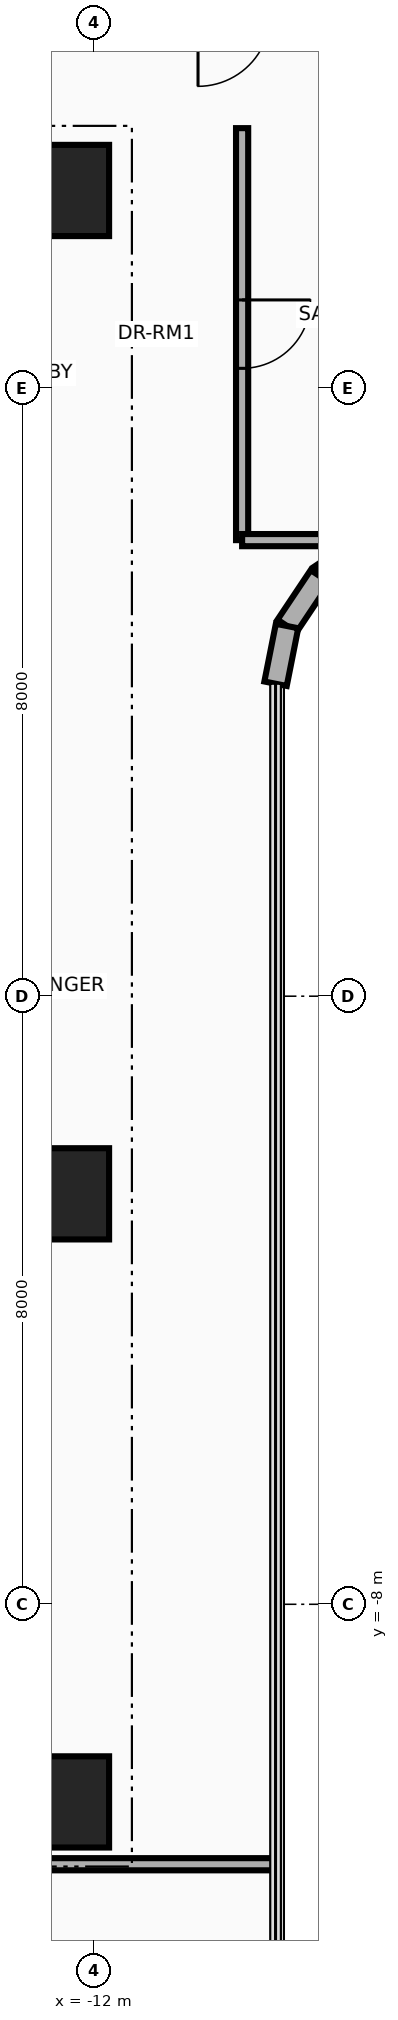
"""IFC4 building model, lengths in metres.
Left out: names, types, materials, properties, quantities, classifications, styles, units other than length and angle.
Written with IfcOpenShell. Run it as: python <this file> out.ifc"""

import sys

from ifc_helpers import new_model, si_unit, direction, frame, frame_2d, origin, origin_2d, place, context, subcontext, project, spatial, rectangle, extrude, source, transform, mapped, element, fill, save


model = new_model("IFC4")
c1 = context("Model", 3, precision=1e-05, world=origin(), true_north=direction((0.0, 1.0)))
c2 = subcontext(c1, "Body", "Model", "MODEL_VIEW")
j1 = project(units=[si_unit("LENGTHUNIT", "METRE"), si_unit("PLANEANGLEUNIT", "RADIAN")], contexts=[c1])
p1 = place(None, origin())
s1 = spatial("IfcSite", under=j1, at=p1, CompositionType="ELEMENT")
p2 = place(p1, origin())
s2 = spatial("IfcBuilding", under=s1, at=p2, CompositionType="ELEMENT")
p3 = place(p2, frame((0.0, 0.0, 157.5)))
s3 = spatial("IfcBuildingStorey", under=s2, at=p3, CompositionType="ELEMENT", Elevation=157.5)
for number, where, z_axis, x_axis in (
    (1, (-22.65, 10.8, 0.0), (0.0, 0.0, 1.0), (1.0, 0.0, 0.0)),
    (2, (-22.65, -10.8, 0.0), (0.0, 0.0, 1.0), (1.0, 0.0, 0.0)),
):
    element("IfcWall", number, at=place(p3, frame(where, z_axis=z_axis, x_axis=x_axis)), inside=s3, PredefinedType="SHEAR", context=c2, shape_type="SweptSolid", body=[
        extrude(rectangle(XDim=10.25, YDim=0.55, at=frame_2d((5.125, 0.0))), origin(), (0.0, 0.0, 1.0), 3.46),
    ])
m1 = source(origin(), c2, "Body", "SweptSolid", [
    extrude(rectangle(XDim=1.2, YDim=1.2, at=origin_2d()), origin(), (0.0, 0.0, 1.0), 3.7),
])
for number, where, z_axis, x_axis in (
    (3, (-12.4, -10.6, 0.0), (0.0, 0.0, 1.0), (1.0, 0.0, 0.0)),
    (4, (-12.4, -2.6, 0.0), (0.0, 0.0, 1.0), (1.0, 0.0, 0.0)),
    (5, (-12.4, 10.6, 0.0), (0.0, 0.0, 1.0), (1.0, 0.0, 0.0)),
):
    element("IfcColumn", number, at=place(p3, frame(where, z_axis=z_axis, x_axis=x_axis)), inside=s3, PredefinedType="COLUMN", context=c2, shape_type="MappedRepresentation", body=[
        mapped(m1, transform((0.0, 0.0, 0.0), x_axis=(1.0, 0.0, 0.0), y_axis=(0.0, 1.0, 0.0), z_axis=(0.0, 0.0, 1.0), scale=1.0)),
    ])
for number, where, z_axis, x_axis in (
    (6, (-8.37, 5.959, 0.0), (0.0, 0.0, 1.0), (-0.831, -0.556, 0.0)),
    (7, (-9.023, 5.523, 0.0), (0.0, 0.0, 1.0), (-0.556, -0.831, 0.0)),
):
    element("IfcWall", number, at=place(p3, frame(where, z_axis=z_axis, x_axis=x_axis)), inside=s3, PredefinedType="SOLIDWALL", context=c2, shape_type="SweptSolid", body=[
        extrude(rectangle(XDim=0.785, YDim=0.3, at=frame_2d((0.393, 0.0))), origin(), (0.0, 0.0, 1.0), 3.46),
    ])
p4 = place(p3, frame((-9.459, 4.87, 0.0), z_axis=(0.0, 0.0, 1.0), x_axis=(-0.195206365311, -0.98076219082, 0.0)))
e8 = element("IfcWall", 8, at=p4, inside=s3, PredefinedType="SOLIDWALL", context=c2, shape_type="SweptSolid", body=[
    extrude(rectangle(XDim=0.774, YDim=0.3, at=frame_2d((0.387, 0.0))), origin(), (0.0, 0.0, 1.0), 3.46),
])
p5 = place(p3, frame((-23.45, -11.42, 0.0), z_axis=(0.0, 0.0, 1.0), x_axis=(1.0, 0.0, 0.0)))
e9 = element("IfcWall", 9, at=p5, inside=s3, PredefinedType="PARTITIONING", context=c2, shape_type="SweptSolid", body=[
    extrude(rectangle(XDim=13.84, YDim=0.16, at=frame_2d((6.92, 0.0))), origin(), (0.0, 0.0, 1.0), 2.834),
])
p6 = place(p3, frame((-10.05, 6.0, 0.0), z_axis=(0.0, 0.0, 1.0), x_axis=(0.0, 1.0, 0.0)))
e10 = element("IfcWall", 10, at=p6, inside=s3, PredefinedType="PARTITIONING", context=c2, shape_type="SweptSolid", body=[
    extrude(rectangle(XDim=5.42, YDim=0.16, at=frame_2d((2.71, 0.0))), origin(), (0.0, 0.0, 1.0), 3.46),
])
p7 = place(p6, frame((2.26, 0.0, 0.0)))
e11 = element("IfcOpeningElement", 11, at=p7, cuts=e10, PredefinedType="OPENING", context=c2, shape_type="SweptSolid", body=[
    extrude(rectangle(XDim=0.9, YDim=2.1, at=frame_2d((0.45, 1.05))), frame((0.0, 0.095, 0.0), z_axis=(0.0, -1.0, 0.0), x_axis=(1.0, 0.0, 0.0)), (0.0, 0.0, 1.0), 0.19),
])
p8 = place(p3, frame((-10.05, 6.0, 0.0), z_axis=(0.0, 0.0, 1.0), x_axis=(1.0, 0.0, 0.0)))
e12 = element("IfcWall", 12, at=p8, inside=s3, PredefinedType="PARTITIONING", context=c2, shape_type="SweptSolid", body=[
    extrude(rectangle(XDim=1.516, YDim=0.16, at=frame_2d((0.758, 0.0))), origin(), (0.0, 0.0, 1.0), 3.46),
])
p9 = place(p7, frame((0.9, 0.0, 0.0), z_axis=(0.0, 0.0, 1.0), x_axis=(-1.0, 0.0, 0.0)))
e13 = element("IfcDoor", 13, at=p9, inside=s3, OperationType="SINGLE_SWING_LEFT", PredefinedType="DOOR", context=c2, shape_type="SweptSolid", body=[
    extrude(rectangle(XDim=0.9, YDim=2.1, at=frame_2d((0.45, 1.05))), frame((0.0, 0.025, 0.0), z_axis=(0.0, -1.0, 0.0), x_axis=(1.0, 0.0, 0.0)), (0.0, 0.0, 1.0), 0.05),
])
fill(e11, e13)
save(model, sys.argv[1])
